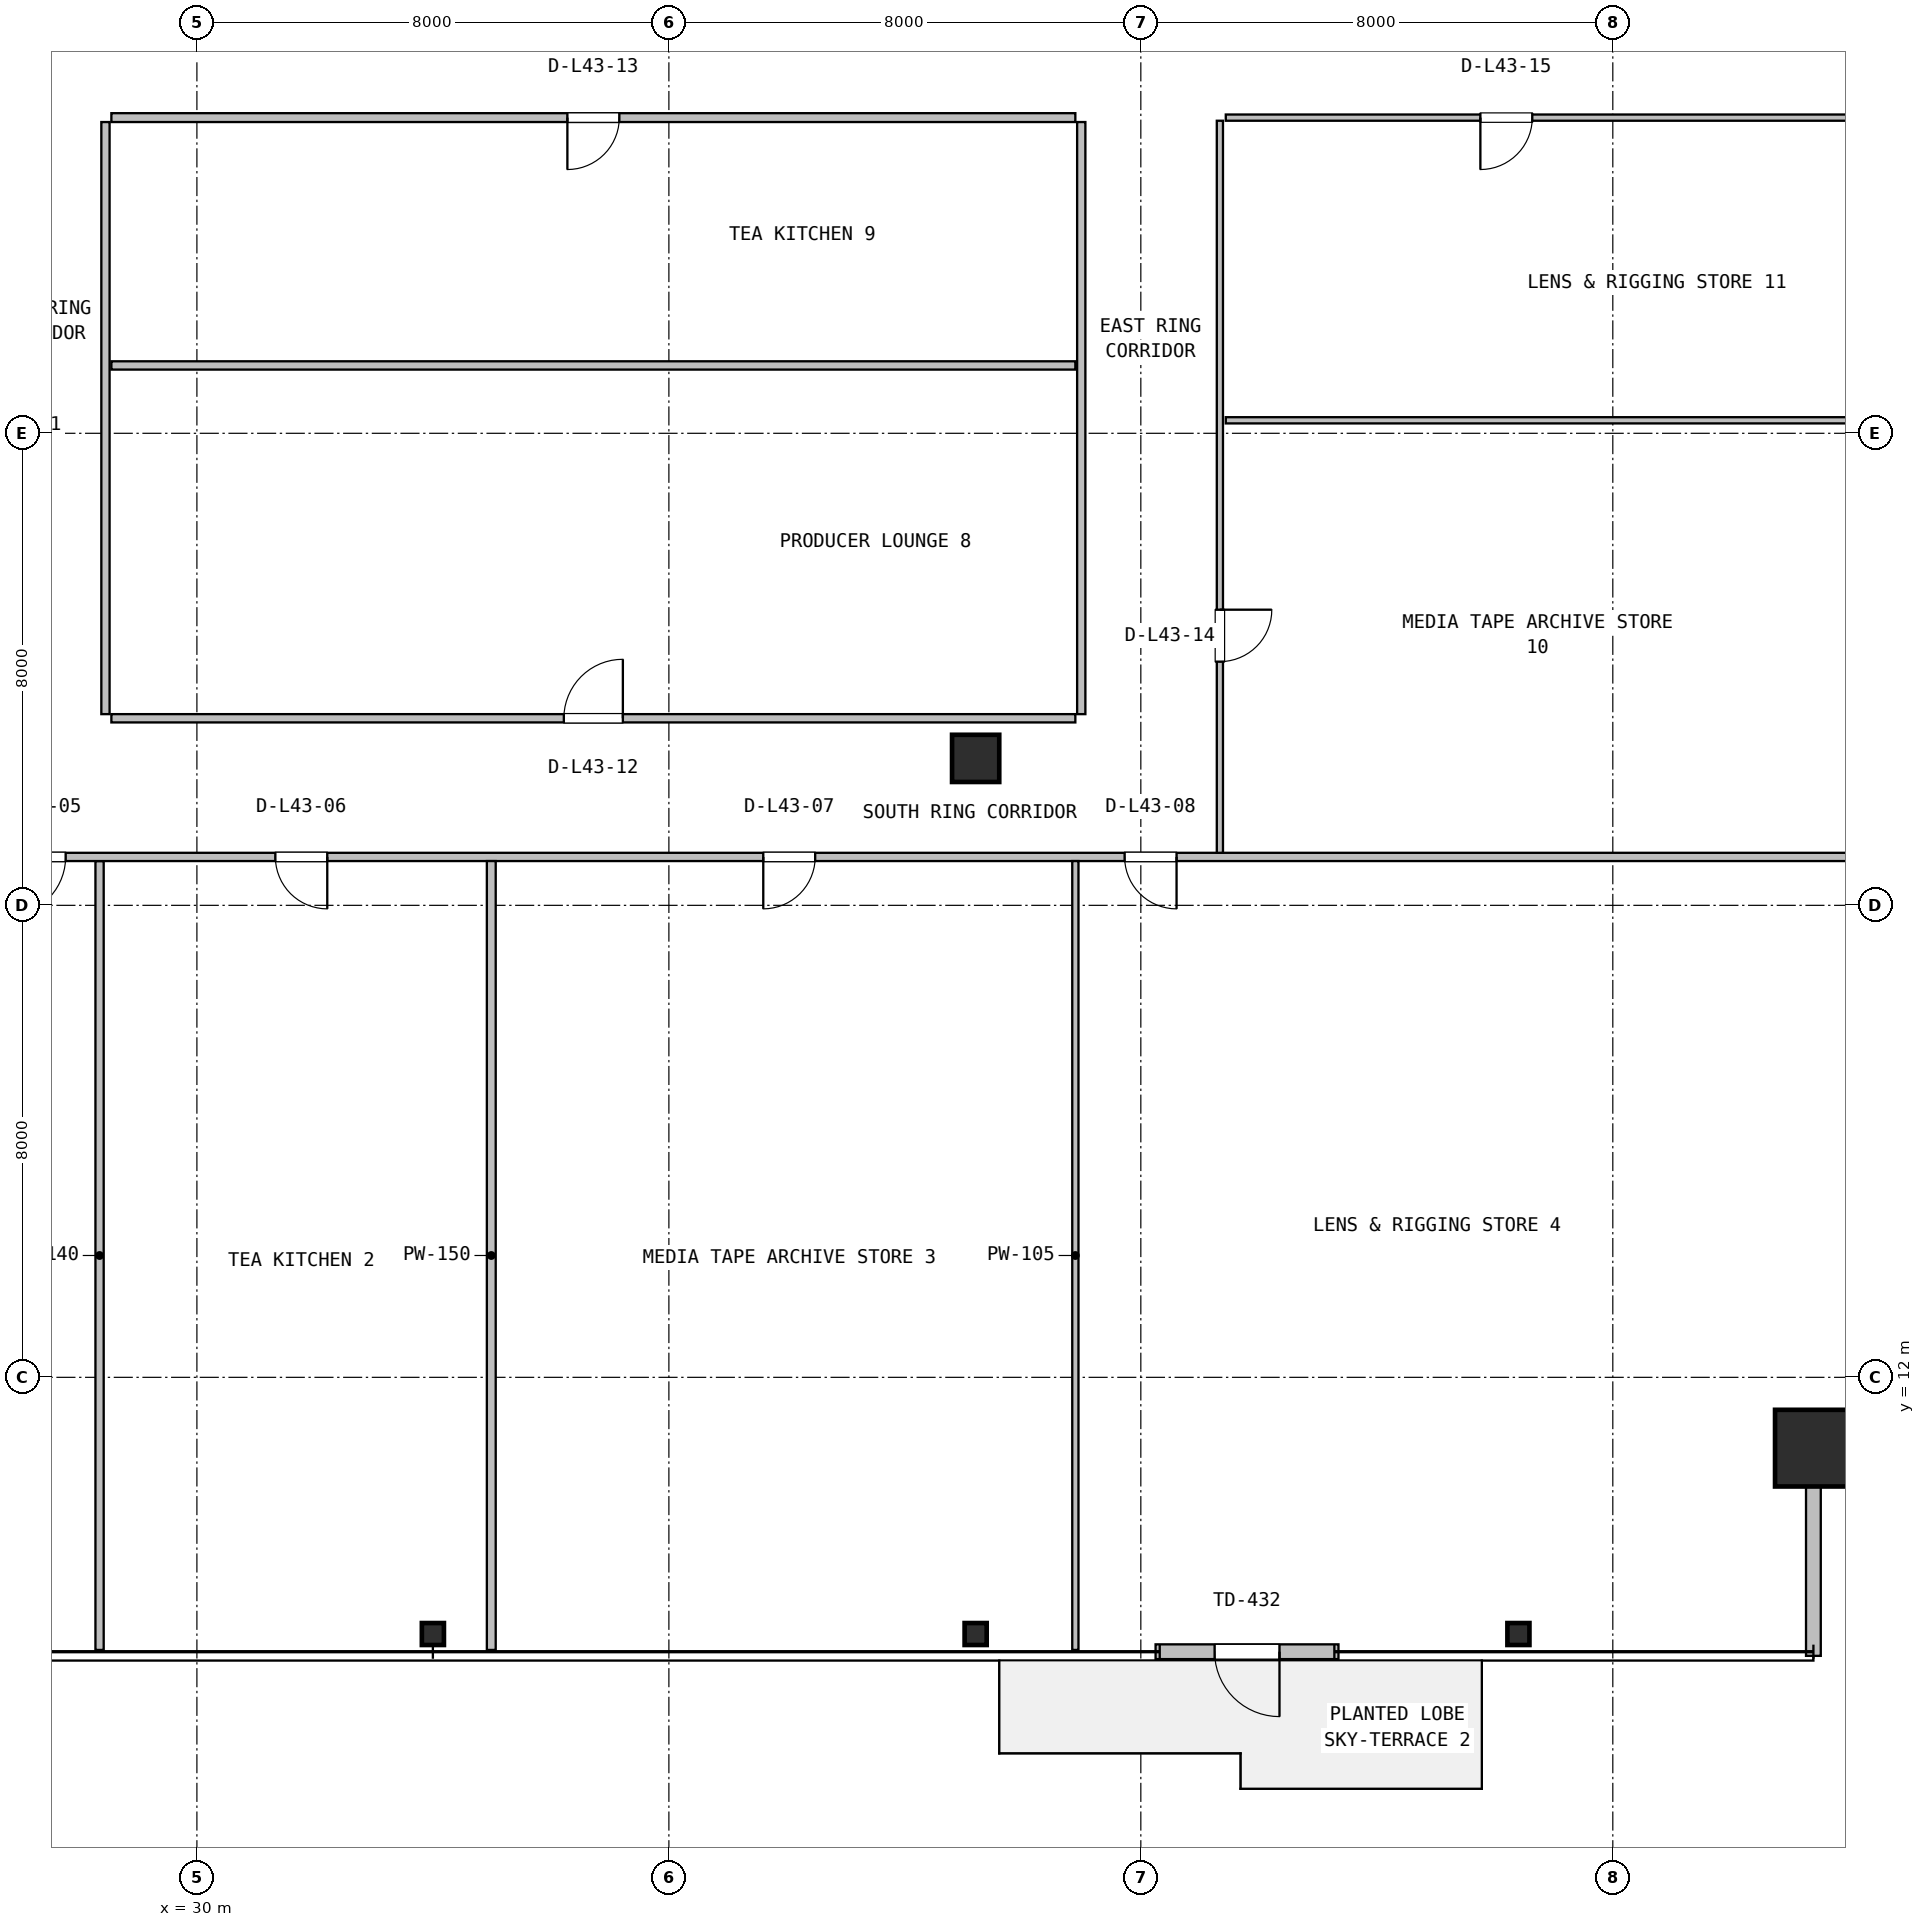
"""IFC4 building model, lengths in metres.
Left out: names, types, materials, properties, quantities, classifications, styles, units other than length and angle.
Written with IfcOpenShell. Run it as: python <this file> out.ifc"""

import sys

from ifc_helpers import new_model, si_unit, direction, frame, frame_2d, origin, origin_2d, place, context, subcontext, project, spatial, rectangle, hollow_rectangle, i_section, extrude, source, transform, mapped, element, fill, save


model = new_model("IFC4")
c1 = context("Model", 3, precision=1e-05, world=origin(), true_north=direction((0.0, 1.0)))
c2 = subcontext(c1, "Body", "Model", "MODEL_VIEW")
j1 = project(units=[si_unit("LENGTHUNIT", "METRE"), si_unit("PLANEANGLEUNIT", "RADIAN")], contexts=[c1])
p1 = place(None, origin())
s1 = spatial("IfcSite", under=j1, at=p1, CompositionType="ELEMENT")
p2 = place(p1, origin())
s2 = spatial("IfcBuilding", under=s1, at=p2, CompositionType="ELEMENT")
p3 = place(p2, frame((0.0, 0.0, 176.2)))
s3 = spatial("IfcBuildingStorey", under=s2, at=p3, CompositionType="ELEMENT", Elevation=176.2)
m1 = source(origin(), c2, "Body", "SweptSolid", [
    extrude(hollow_rectangle(XDim=1.3, YDim=1.3, WallThickness=0.05, at=origin_2d()), origin(), (0.0, 0.0, 1.0), 3.8),
])
p4 = place(p3, frame((57.4, 10.8, 0.0), z_axis=(0.0, 0.0, 1.0), x_axis=(1.0, 0.0, 0.0)))
e1 = element("IfcColumn", 1, at=p4, inside=s3, PredefinedType="COLUMN", context=c2, shape_type="MappedRepresentation", body=[
    mapped(m1, transform((0.0, 0.0, 0.0), x_axis=(1.0, 0.0, 0.0), y_axis=(0.0, 1.0, 0.0), z_axis=(0.0, 0.0, 1.0), scale=1.0)),
])
m2 = source(origin(), c2, "Body", "SweptSolid", [
    extrude(i_section(OverallWidth=0.374, OverallDepth=0.372, WebThickness=0.016, FlangeThickness=0.026, FilletRadius=0.016, at=origin_2d()), origin(), (0.0, 0.0, 1.0), 3.8),
])
for number, where, z_axis, x_axis in (
    (2, (34.0, 7.65, 0.0), (0.0, 0.0, 1.0), (1.0, 0.0, 0.0)),
    (3, (43.2, 7.65, 0.0), (0.0, 0.0, 1.0), (1.0, 0.0, 0.0)),
    (4, (52.4, 7.65, 0.0), (0.0, 0.0, 1.0), (1.0, 0.0, 0.0)),
):
    element("IfcColumn", number, at=place(p3, frame(where, z_axis=z_axis, x_axis=x_axis)), inside=s3, PredefinedType="COLUMN", context=c2, shape_type="MappedRepresentation", body=[
        mapped(m2, transform((0.0, 0.0, 0.0), x_axis=(1.0, 0.0, 0.0), y_axis=(0.0, 1.0, 0.0), z_axis=(0.0, 0.0, 1.0), scale=1.0)),
    ])
m3 = source(origin(), c2, "Body", "SweptSolid", [
    extrude(rectangle(XDim=0.8, YDim=0.8, at=origin_2d()), origin(), (0.0, 0.0, 1.0), 3.8),
])
p5 = place(p3, frame((43.2, 22.49, 0.0), z_axis=(0.0, 0.0, 1.0), x_axis=(1.0, 0.0, 0.0)))
e5 = element("IfcColumn", 5, at=p5, inside=s3, PredefinedType="COLUMN", context=c2, shape_type="MappedRepresentation", body=[
    mapped(m3, transform((0.0, 0.0, 0.0), x_axis=(1.0, 0.0, 0.0), y_axis=(0.0, 1.0, 0.0), z_axis=(0.0, 0.0, 1.0), scale=1.0)),
])
p6 = place(p3, frame((46.25, 7.35, 0.0), z_axis=(0.0, 0.0, 1.0), x_axis=(1.0, 0.0, 0.0)))
e6 = element("IfcWall", 6, at=p6, inside=s3, PredefinedType="SOLIDWALL", context=c2, shape_type="SweptSolid", body=[
    extrude(rectangle(XDim=3.1, YDim=0.25, at=frame_2d((1.55, 0.0))), origin(), (0.0, 0.0, 1.0), 3.53),
])
p7 = place(p6, frame((1.0, 0.0, 0.0)))
e7 = element("IfcOpeningElement", 7, at=p7, cuts=e6, PredefinedType="OPENING", context=c2, shape_type="SweptSolid", body=[
    extrude(rectangle(XDim=1.1, YDim=2.15, at=frame_2d((0.55, 1.075))), frame((0.0, 0.135, 0.0), z_axis=(0.0, -1.0, 0.0), x_axis=(1.0, 0.0, 0.0)), (0.0, 0.0, 1.0), 0.27),
])
p8 = place(p3, frame((57.4, 7.28, 0.0), z_axis=(0.0, 0.0, 1.0), x_axis=(0.0, 1.0, 0.0)))
e8 = element("IfcWall", 8, at=p8, inside=s3, PredefinedType="SOLIDWALL", context=c2, shape_type="SweptSolid", body=[
    extrude(rectangle(XDim=3.6, YDim=0.25, at=frame_2d((1.8, 0.0))), origin(), (0.0, 0.0, 1.0), 3.108),
])
p9 = place(p3, frame((28.35, 7.38, 0.0), z_axis=(0.0, 0.0, 1.0), x_axis=(0.0, 1.0, 0.0)))
e9 = element("IfcWall", 9, at=p9, inside=s3, PredefinedType="PARTITIONING", context=c2, shape_type="SweptSolid", body=[
    extrude(rectangle(XDim=13.37, YDim=0.14, at=frame_2d((6.685, 0.0))), origin(), (0.0, 0.0, 1.0), 3.108),
])
p10 = place(p3, frame((7.18, 20.82, 0.0), z_axis=(0.0, 0.0, 1.0), x_axis=(1.0, 0.0, 0.0)))
e10 = element("IfcWall", 10, at=p10, inside=s3, PredefinedType="PARTITIONING", context=c2, shape_type="SweptSolid", body=[
    extrude(rectangle(XDim=53.64, YDim=0.14, at=frame_2d((26.82, 0.0))), origin(), (0.0, 0.0, 1.0), 2.909),
])
p11 = place(p10, frame((19.595, 0.0, 0.0)))
e11 = element("IfcOpeningElement", 11, at=p11, cuts=e10, PredefinedType="OPENING", context=c2, shape_type="SweptSolid", body=[
    extrude(rectangle(XDim=1.0, YDim=2.1, at=frame_2d((0.5, 1.05))), frame((0.0, 0.08, 0.0), z_axis=(0.0, -1.0, 0.0), x_axis=(1.0, 0.0, 0.0)), (0.0, 0.0, 1.0), 0.16),
])
p12 = place(p10, frame((24.15, 0.0, 0.0)))
e12 = element("IfcOpeningElement", 12, at=p12, cuts=e10, PredefinedType="OPENING", context=c2, shape_type="SweptSolid", body=[
    extrude(rectangle(XDim=0.88, YDim=2.06, at=frame_2d((0.44, 1.03))), frame((0.0, 0.08, 0.0), z_axis=(0.0, -1.0, 0.0), x_axis=(1.0, 0.0, 0.0)), (0.0, 0.0, 1.0), 0.16),
])
p13 = place(p10, frame((32.42, 0.0, 0.0)))
e13 = element("IfcOpeningElement", 13, at=p13, cuts=e10, PredefinedType="OPENING", context=c2, shape_type="SweptSolid", body=[
    extrude(rectangle(XDim=0.88, YDim=2.06, at=frame_2d((0.44, 1.03))), frame((0.0, 0.08, 0.0), z_axis=(0.0, -1.0, 0.0), x_axis=(1.0, 0.0, 0.0)), (0.0, 0.0, 1.0), 0.16),
])
p14 = place(p10, frame((38.545, 0.0, 0.0)))
e14 = element("IfcOpeningElement", 14, at=p14, cuts=e10, PredefinedType="OPENING", context=c2, shape_type="SweptSolid", body=[
    extrude(rectangle(XDim=0.88, YDim=2.06, at=frame_2d((0.44, 1.03))), frame((0.0, 0.08, 0.0), z_axis=(0.0, -1.0, 0.0), x_axis=(1.0, 0.0, 0.0)), (0.0, 0.0, 1.0), 0.16),
])
p15 = place(p3, frame((34.99, 7.38, 0.0), z_axis=(0.0, 0.0, 1.0), x_axis=(0.0, 1.0, 0.0)))
e15 = element("IfcWall", 15, at=p15, inside=s3, PredefinedType="PARTITIONING", context=c2, shape_type="SweptSolid", body=[
    extrude(rectangle(XDim=13.37, YDim=0.15, at=frame_2d((6.685, 0.0))), origin(), (0.0, 0.0, 1.0), 3.108),
])
p16 = place(p3, frame((44.89, 7.38, 0.0), z_axis=(0.0, 0.0, 1.0), x_axis=(0.0, 1.0, 0.0)))
e16 = element("IfcWall", 16, at=p16, inside=s3, PredefinedType="PARTITIONING", context=c2, shape_type="SweptSolid", body=[
    extrude(rectangle(XDim=13.37, YDim=0.105, at=frame_2d((6.685, 0.0))), origin(), (0.0, 0.0, 1.0), 3.108),
])
p17 = place(p3, frame((28.55, 23.17, 0.0), z_axis=(0.0, 0.0, 1.0), x_axis=(1.0, 0.0, 0.0)))
e17 = element("IfcWall", 17, at=p17, inside=s3, PredefinedType="PARTITIONING", context=c2, shape_type="SweptSolid", body=[
    extrude(rectangle(XDim=16.34, YDim=0.14, at=frame_2d((8.17, 0.0))), origin(), (0.0, 0.0, 1.0), 2.909),
])
p18 = place(p17, frame((7.67, 0.0, 0.0)))
e18 = element("IfcOpeningElement", 18, at=p18, cuts=e17, PredefinedType="OPENING", context=c2, shape_type="SweptSolid", body=[
    extrude(rectangle(XDim=1.0, YDim=2.1, at=frame_2d((0.5, 1.05))), frame((0.0, 0.08, 0.0), z_axis=(0.0, -1.0, 0.0), x_axis=(1.0, 0.0, 0.0)), (0.0, 0.0, 1.0), 0.16),
])
p19 = place(p3, frame((44.99, 23.24, 0.0), z_axis=(0.0, 0.0, 1.0), x_axis=(0.0, 1.0, 0.0)))
e19 = element("IfcWall", 19, at=p19, inside=s3, PredefinedType="PARTITIONING", context=c2, shape_type="SweptSolid", body=[
    extrude(rectangle(XDim=10.035, YDim=0.14, at=frame_2d((5.018, 0.0))), origin(), (0.0, 0.0, 1.0), 3.222),
])
p20 = place(p3, frame((28.55, 29.15, 0.0), z_axis=(0.0, 0.0, 1.0), x_axis=(1.0, 0.0, 0.0)))
e20 = element("IfcWall", 20, at=p20, inside=s3, PredefinedType="PARTITIONING", context=c2, shape_type="SweptSolid", body=[
    extrude(rectangle(XDim=16.34, YDim=0.14, at=frame_2d((8.17, 0.0))), origin(), (0.0, 0.0, 1.0), 2.909),
])
p21 = place(p3, frame((28.45, 23.24, 0.0), z_axis=(0.0, 0.0, 1.0), x_axis=(0.0, 1.0, 0.0)))
e21 = element("IfcWall", 21, at=p21, inside=s3, PredefinedType="PARTITIONING", context=c2, shape_type="SweptSolid", body=[
    extrude(rectangle(XDim=10.035, YDim=0.14, at=frame_2d((5.018, 0.0))), origin(), (0.0, 0.0, 1.0), 3.222),
])
p22 = place(p3, frame((28.55, 33.35, 0.0), z_axis=(0.0, 0.0, 1.0), x_axis=(1.0, 0.0, 0.0)))
e22 = element("IfcWall", 22, at=p22, inside=s3, PredefinedType="PARTITIONING", context=c2, shape_type="SweptSolid", body=[
    extrude(rectangle(XDim=16.34, YDim=0.15, at=frame_2d((8.17, 0.0))), origin(), (0.0, 0.0, 1.0), 2.909),
])
p23 = place(p22, frame((7.73, 0.0, 0.0)))
e23 = element("IfcOpeningElement", 23, at=p23, cuts=e22, PredefinedType="OPENING", context=c2, shape_type="SweptSolid", body=[
    extrude(rectangle(XDim=0.88, YDim=2.06, at=frame_2d((0.44, 1.03))), frame((0.0, 0.085, 0.0), z_axis=(0.0, -1.0, 0.0), x_axis=(1.0, 0.0, 0.0)), (0.0, 0.0, 1.0), 0.17),
])
p24 = place(p3, frame((47.44, 28.22, 0.0), z_axis=(0.0, 0.0, 1.0), x_axis=(1.0, 0.0, 0.0)))
e24 = element("IfcWall", 24, at=p24, inside=s3, PredefinedType="PARTITIONING", context=c2, shape_type="SweptSolid", body=[
    extrude(rectangle(XDim=13.38, YDim=0.105, at=frame_2d((6.69, 0.0))), origin(), (0.0, 0.0, 1.0), 3.108),
])
p25 = place(p3, frame((47.34, 20.89, 0.0), z_axis=(0.0, 0.0, 1.0), x_axis=(0.0, 1.0, 0.0)))
e25 = element("IfcWall", 25, at=p25, inside=s3, PredefinedType="PARTITIONING", context=c2, shape_type="SweptSolid", body=[
    extrude(rectangle(XDim=12.407, YDim=0.105, at=frame_2d((6.204, 0.0))), origin(), (0.0, 0.0, 1.0), 3.222),
])
p26 = place(p25, frame((3.24, 0.0, 0.0)))
e26 = element("IfcOpeningElement", 26, at=p26, cuts=e25, PredefinedType="OPENING", context=c2, shape_type="SweptSolid", body=[
    extrude(rectangle(XDim=0.88, YDim=2.06, at=frame_2d((0.44, 1.03))), frame((0.0, 0.062, 0.0), z_axis=(0.0, -1.0, 0.0), x_axis=(1.0, 0.0, 0.0)), (0.0, 0.0, 1.0), 0.125),
])
p27 = place(p3, frame((47.44, 33.35, 0.0), z_axis=(0.0, 0.0, 1.0), x_axis=(1.0, 0.0, 0.0)))
e27 = element("IfcWall", 27, at=p27, inside=s3, PredefinedType="PARTITIONING", context=c2, shape_type="SweptSolid", body=[
    extrude(rectangle(XDim=13.38, YDim=0.105, at=frame_2d((6.69, 0.0))), origin(), (0.0, 0.0, 1.0), 3.108),
])
p28 = place(p27, frame((4.315, 0.0, 0.0)))
e28 = element("IfcOpeningElement", 28, at=p28, cuts=e27, PredefinedType="OPENING", context=c2, shape_type="SweptSolid", body=[
    extrude(rectangle(XDim=0.88, YDim=2.06, at=frame_2d((0.44, 1.03))), frame((0.0, 0.062, 0.0), z_axis=(0.0, -1.0, 0.0), x_axis=(1.0, 0.0, 0.0)), (0.0, 0.0, 1.0), 0.125),
])
m4 = source(origin(), c2, "Body", "SweptSolid", [
    extrude(rectangle(XDim=1.1, YDim=2.15, at=frame_2d((0.55, 1.075))), frame((0.0, 0.025, 0.0), z_axis=(0.0, -1.0, 0.0), x_axis=(1.0, 0.0, 0.0)), (0.0, 0.0, 1.0), 0.05),
])
p29 = place(p7, frame((1.1, 0.0, 0.0), z_axis=(0.0, 0.0, 1.0), x_axis=(-1.0, 0.0, 0.0)))
e29 = element("IfcDoor", 29, at=p29, inside=s3, OperationType="SINGLE_SWING_RIGHT", PredefinedType="DOOR", context=c2, shape_type="MappedRepresentation", body=[
    mapped(m4, transform((0.0, 0.0, 0.0), x_axis=(1.0, 0.0, 0.0), y_axis=(0.0, 1.0, 0.0), z_axis=(0.0, 0.0, 1.0), scale=1.0)),
])
fill(e7, e29)
m5 = source(origin(), c2, "Body", "SweptSolid", [
    extrude(rectangle(XDim=1.0, YDim=2.1, at=frame_2d((0.5, 1.05))), frame((0.0, 0.025, 0.0), z_axis=(0.0, -1.0, 0.0), x_axis=(1.0, 0.0, 0.0)), (0.0, 0.0, 1.0), 0.05),
])
p30 = place(p11, frame((1.0, 0.0, 0.0), z_axis=(0.0, 0.0, 1.0), x_axis=(-1.0, 0.0, 0.0)))
e30 = element("IfcDoor", 30, at=p30, inside=s3, OperationType="SINGLE_SWING_LEFT", PredefinedType="DOOR", context=c2, shape_type="MappedRepresentation", body=[
    mapped(m5, transform((0.0, 0.0, 0.0), x_axis=(1.0, 0.0, 0.0), y_axis=(0.0, 1.0, 0.0), z_axis=(0.0, 0.0, 1.0), scale=1.0)),
])
fill(e11, e30)
m6 = source(origin(), c2, "Body", "SweptSolid", [
    extrude(rectangle(XDim=0.88, YDim=2.06, at=frame_2d((0.44, 1.03))), frame((0.0, 0.025, 0.0), z_axis=(0.0, -1.0, 0.0), x_axis=(1.0, 0.0, 0.0)), (0.0, 0.0, 1.0), 0.05),
])
p31 = place(p12, frame((0.88, 0.0, 0.0), z_axis=(0.0, 0.0, 1.0), x_axis=(-1.0, 0.0, 0.0)))
e31 = element("IfcDoor", 31, at=p31, inside=s3, OperationType="SINGLE_SWING_RIGHT", PredefinedType="DOOR", context=c2, shape_type="MappedRepresentation", body=[
    mapped(m6, transform((0.0, 0.0, 0.0), x_axis=(1.0, 0.0, 0.0), y_axis=(0.0, 1.0, 0.0), z_axis=(0.0, 0.0, 1.0), scale=1.0)),
])
fill(e12, e31)
p32 = place(p13, frame((0.88, 0.0, 0.0), z_axis=(0.0, 0.0, 1.0), x_axis=(-1.0, 0.0, 0.0)))
e32 = element("IfcDoor", 32, at=p32, inside=s3, OperationType="SINGLE_SWING_LEFT", PredefinedType="DOOR", context=c2, shape_type="MappedRepresentation", body=[
    mapped(m6, transform((0.0, 0.0, 0.0), x_axis=(1.0, 0.0, 0.0), y_axis=(0.0, 1.0, 0.0), z_axis=(0.0, 0.0, 1.0), scale=1.0)),
])
fill(e13, e32)
p33 = place(p14, frame((0.88, 0.0, 0.0), z_axis=(0.0, 0.0, 1.0), x_axis=(-1.0, 0.0, 0.0)))
e33 = element("IfcDoor", 33, at=p33, inside=s3, OperationType="SINGLE_SWING_RIGHT", PredefinedType="DOOR", context=c2, shape_type="MappedRepresentation", body=[
    mapped(m6, transform((0.0, 0.0, 0.0), x_axis=(1.0, 0.0, 0.0), y_axis=(0.0, 1.0, 0.0), z_axis=(0.0, 0.0, 1.0), scale=1.0)),
])
fill(e14, e33)
p34 = place(p18, origin())
e34 = element("IfcDoor", 34, at=p34, inside=s3, OperationType="SINGLE_SWING_RIGHT", PredefinedType="DOOR", context=c2, shape_type="MappedRepresentation", body=[
    mapped(m5, transform((0.0, 0.0, 0.0), x_axis=(1.0, 0.0, 0.0), y_axis=(0.0, 1.0, 0.0), z_axis=(0.0, 0.0, 1.0), scale=1.0)),
])
fill(e18, e34)
p35 = place(p23, frame((0.88, 0.0, 0.0), z_axis=(0.0, 0.0, 1.0), x_axis=(-1.0, 0.0, 0.0)))
e35 = element("IfcDoor", 35, at=p35, inside=s3, OperationType="SINGLE_SWING_LEFT", PredefinedType="DOOR", context=c2, shape_type="MappedRepresentation", body=[
    mapped(m6, transform((0.0, 0.0, 0.0), x_axis=(1.0, 0.0, 0.0), y_axis=(0.0, 1.0, 0.0), z_axis=(0.0, 0.0, 1.0), scale=1.0)),
])
fill(e23, e35)
p36 = place(p26, frame((0.88, 0.0, 0.0), z_axis=(0.0, 0.0, 1.0), x_axis=(-1.0, 0.0, 0.0)))
e36 = element("IfcDoor", 36, at=p36, inside=s3, OperationType="SINGLE_SWING_RIGHT", PredefinedType="DOOR", context=c2, shape_type="MappedRepresentation", body=[
    mapped(m6, transform((0.0, 0.0, 0.0), x_axis=(1.0, 0.0, 0.0), y_axis=(0.0, 1.0, 0.0), z_axis=(0.0, 0.0, 1.0), scale=1.0)),
])
fill(e26, e36)
p37 = place(p28, frame((0.88, 0.0, 0.0), z_axis=(0.0, 0.0, 1.0), x_axis=(-1.0, 0.0, 0.0)))
e37 = element("IfcDoor", 37, at=p37, inside=s3, OperationType="SINGLE_SWING_LEFT", PredefinedType="DOOR", context=c2, shape_type="MappedRepresentation", body=[
    mapped(m6, transform((0.0, 0.0, 0.0), x_axis=(1.0, 0.0, 0.0), y_axis=(0.0, 1.0, 0.0), z_axis=(0.0, 0.0, 1.0), scale=1.0)),
])
fill(e28, e37)
save(model, sys.argv[1])
